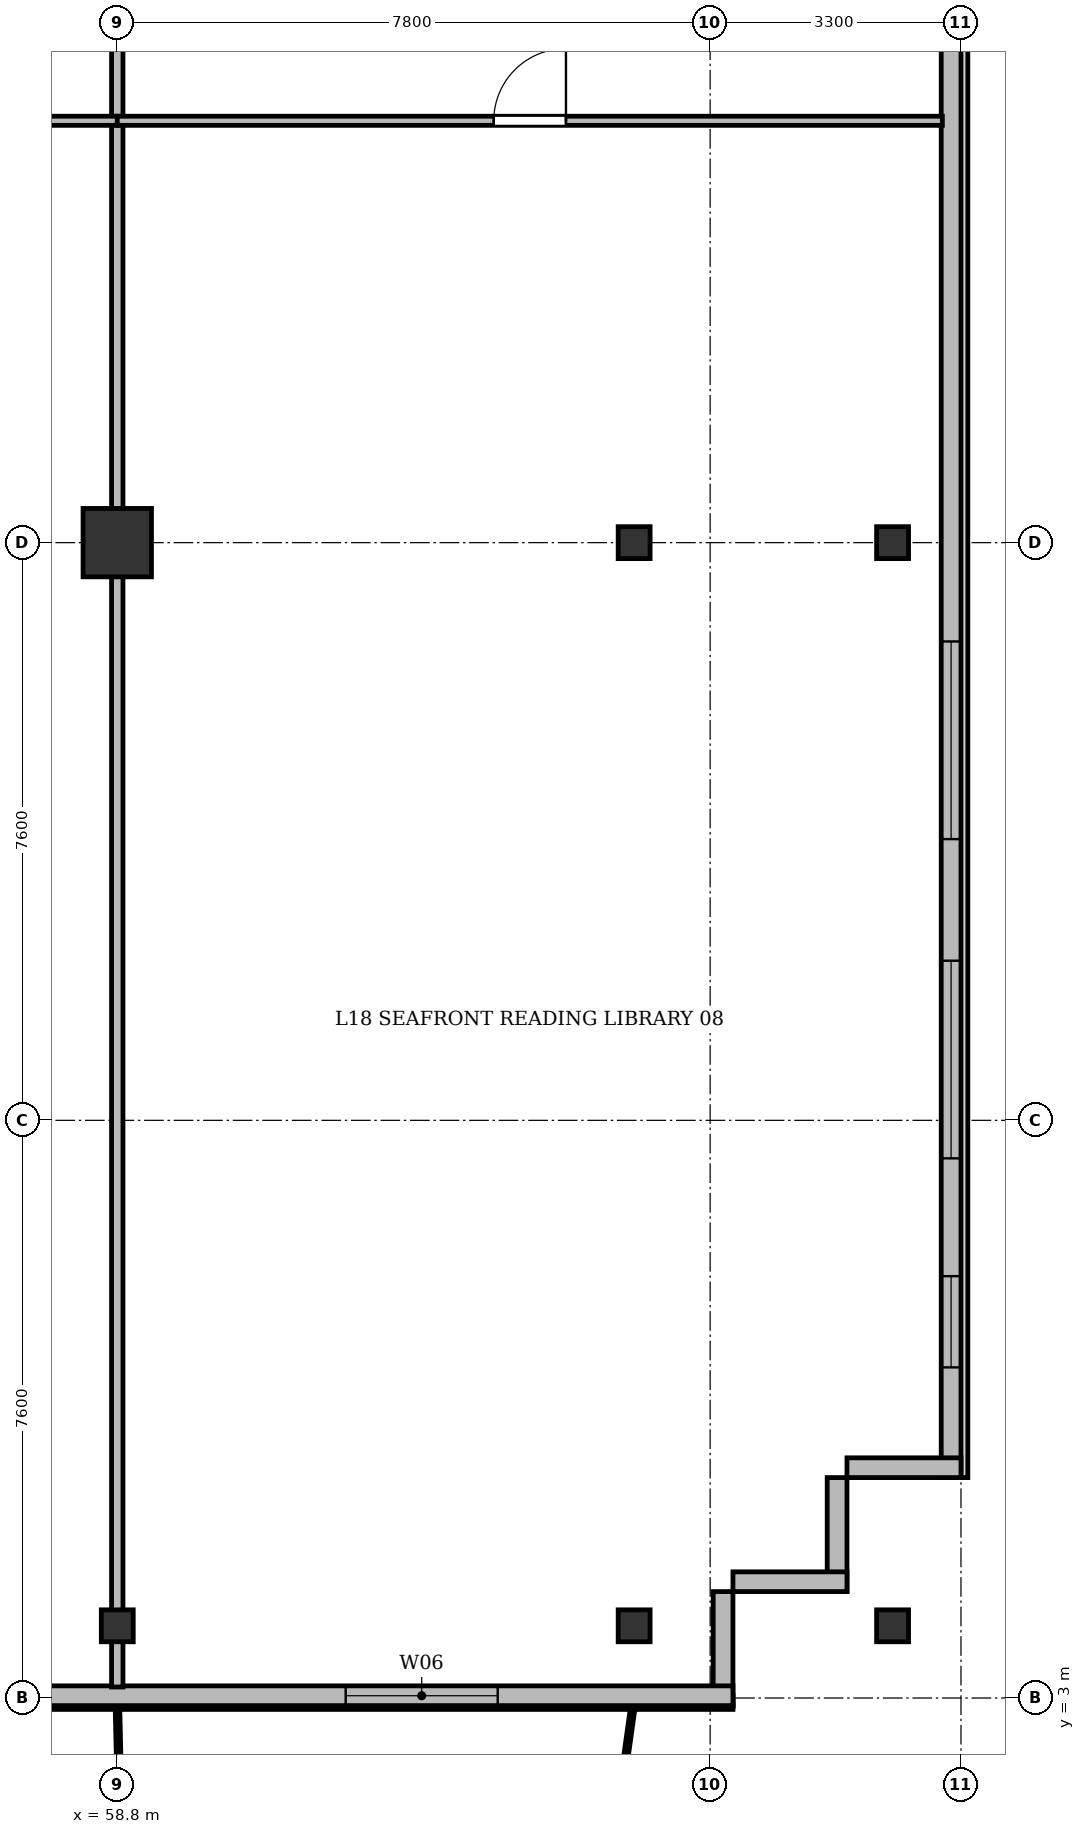
"""IFC4 building model, lengths in metres.
Left out: names, types, materials, properties, quantities, classifications, styles, units other than length and angle.
Written with IfcOpenShell. Run it as: python <this file> out.ifc"""

import sys

from ifc_helpers import new_model, si_unit, direction, frame, frame_2d, origin, origin_2d, place, context, subcontext, project, spatial, rectangle, i_section, extrude, source, transform, mapped, element, fill, save


model = new_model("IFC4")
c1 = context("Model", 3, precision=1e-05, world=origin(), true_north=direction((0.0, 1.0)))
c2 = subcontext(c1, "Body", "Model", "MODEL_VIEW")
j1 = project(units=[si_unit("LENGTHUNIT", "METRE"), si_unit("PLANEANGLEUNIT", "RADIAN")], contexts=[c1])
p1 = place(None, origin())
s1 = spatial("IfcSite", under=j1, at=p1, CompositionType="ELEMENT")
p2 = place(p1, origin())
s2 = spatial("IfcBuilding", under=s1, at=p2, CompositionType="ELEMENT")
p3 = place(p2, frame((0.0, 0.0, 70.3)))
s3 = spatial("IfcBuildingStorey", under=s2, at=p3, CompositionType="ELEMENT", Elevation=70.3)
m1 = source(origin(), c2, "Body", "SweptSolid", [
    extrude(i_section(OverallWidth=0.42, OverallDepth=0.42, WebThickness=0.026, FlangeThickness=0.04, at=origin_2d()), origin(), (0.0, 0.0, 1.0), 3.6),
])
p4 = place(p3, frame((58.8, 3.95, 0.0), z_axis=(0.0, 0.0, 1.0), x_axis=(1.0, 0.0, 0.0)))
e1 = element("IfcColumn", 1, at=p4, inside=s3, PredefinedType="COLUMN", context=c2, shape_type="MappedRepresentation", body=[
    mapped(m1, transform((0.0, 0.0, 0.0), x_axis=(1.0, 0.0, 0.0), y_axis=(0.0, 1.0, 0.0), z_axis=(0.0, 0.0, 1.0), scale=1.0)),
])
m2 = source(origin(), c2, "Body", "SweptSolid", [
    extrude(rectangle(XDim=0.9, YDim=0.9, at=origin_2d()), origin(), (0.0, 0.0, 1.0), 3.6),
])
p5 = place(p3, frame((58.8, 18.2, 0.0), z_axis=(0.0, 0.0, 1.0), x_axis=(1.0, 0.0, 0.0)))
e2 = element("IfcColumn", 2, at=p5, inside=s3, PredefinedType="COLUMN", context=c2, shape_type="MappedRepresentation", body=[
    mapped(m2, transform((0.0, 0.0, 0.0), x_axis=(1.0, 0.0, 0.0), y_axis=(0.0, 1.0, 0.0), z_axis=(0.0, 0.0, 1.0), scale=1.0)),
])
for number, where, z_axis, x_axis in (
    (3, (65.6, 3.95, 0.0), (0.0, 0.0, 1.0), (1.0, 0.0, 0.0)),
    (4, (65.6, 18.2, 0.0), (0.0, 0.0, 1.0), (1.0, 0.0, 0.0)),
    (5, (69.0, 3.95, 0.0), (0.0, 0.0, 1.0), (1.0, 0.0, 0.0)),
    (6, (69.0, 18.2, 0.0), (0.0, 0.0, 1.0), (1.0, 0.0, 0.0)),
):
    element("IfcColumn", number, at=place(p3, frame(where, z_axis=z_axis, x_axis=x_axis)), inside=s3, PredefinedType="COLUMN", context=c2, shape_type="MappedRepresentation", body=[
        mapped(m1, transform((0.0, 0.0, 0.0), x_axis=(1.0, 0.0, 0.0), y_axis=(0.0, 1.0, 0.0), z_axis=(0.0, 0.0, 1.0), scale=1.0)),
    ])
p6 = place(p3, frame((69.77, 45.5, 0.0), z_axis=(0.0, 0.0, 1.0), x_axis=(0.0, -1.0, 0.0)))
e7 = element("IfcWall", 7, at=p6, inside=s3, PredefinedType="SOLIDWALL", context=c2, shape_type="SweptSolid", body=[
    extrude(rectangle(XDim=39.6, YDim=0.26, at=frame_2d((19.8, 0.0))), origin(), (0.0, 0.0, 1.0), 3.22),
])
p7 = place(p6, frame((36.95, 0.0, 0.92)))
e8 = element("IfcOpeningElement", 8, at=p7, cuts=e7, PredefinedType="OPENING", context=c2, shape_type="SweptSolid", body=[
    extrude(rectangle(XDim=1.2, YDim=1.65, at=frame_2d((0.6, 0.825))), frame((0.0, 0.14, 0.0), z_axis=(0.0, -1.0, 0.0), x_axis=(1.0, 0.0, 0.0)), (0.0, 0.0, 1.0), 0.28),
])
p8 = place(p6, frame((32.8, 0.0, 0.92)))
e9 = element("IfcOpeningElement", 9, at=p8, cuts=e7, PredefinedType="OPENING", context=c2, shape_type="SweptSolid", body=[
    extrude(rectangle(XDim=2.6, YDim=1.9, at=frame_2d((1.3, 0.95))), frame((0.0, 0.14, 0.0), z_axis=(0.0, -1.0, 0.0), x_axis=(1.0, 0.0, 0.0)), (0.0, 0.0, 1.0), 0.28),
])
p9 = place(p6, frame((28.6, 0.0, 0.92)))
e10 = element("IfcOpeningElement", 10, at=p9, cuts=e7, PredefinedType="OPENING", context=c2, shape_type="SweptSolid", body=[
    extrude(rectangle(XDim=2.6, YDim=1.9, at=frame_2d((1.3, 0.95))), frame((0.0, 0.14, 0.0), z_axis=(0.0, -1.0, 0.0), x_axis=(1.0, 0.0, 0.0)), (0.0, 0.0, 1.0), 0.28),
])
p10 = place(p6, frame((7.4, 0.0, 0.92)))
e11 = element("IfcOpeningElement", 11, at=p10, cuts=e7, PredefinedType="OPENING", context=c2, shape_type="SweptSolid", body=[
    extrude(rectangle(XDim=2.6, YDim=1.9, at=frame_2d((1.3, 0.95))), frame((0.0, 0.14, 0.0), z_axis=(0.0, -1.0, 0.0), x_axis=(1.0, 0.0, 0.0)), (0.0, 0.0, 1.0), 0.28),
])
p11 = place(p6, frame((1.15, 0.0, 0.92)))
e12 = element("IfcOpeningElement", 12, at=p11, cuts=e7, PredefinedType="OPENING", context=c2, shape_type="SweptSolid", body=[
    extrude(rectangle(XDim=1.2, YDim=1.65, at=frame_2d((0.6, 0.825))), frame((0.0, 0.14, 0.0), z_axis=(0.0, -1.0, 0.0), x_axis=(1.0, 0.0, 0.0)), (0.0, 0.0, 1.0), 0.28),
])
p12 = place(p3, frame((69.9, 6.03, 0.0), z_axis=(0.0, 0.0, 1.0), x_axis=(-1.0, 0.0, 0.0)))
e13 = element("IfcWall", 13, at=p12, inside=s3, PredefinedType="SOLIDWALL", context=c2, shape_type="SweptSolid", body=[
    extrude(rectangle(XDim=1.5, YDim=0.26, at=frame_2d((0.75, 0.0))), origin(), (0.0, 0.0, 1.0), 2.632),
])
for number, where, z_axis, x_axis in (
    (14, (68.27, 5.9, 0.0), (0.0, 0.0, 1.0), (0.0, -1.0, 0.0)),
    (15, (68.4, 4.53, 0.0), (0.0, 0.0, 1.0), (-1.0, 0.0, 0.0)),
):
    element("IfcWall", number, at=place(p3, frame(where, z_axis=z_axis, x_axis=x_axis)), inside=s3, PredefinedType="SOLIDWALL", context=c2, shape_type="SweptSolid", body=[
        extrude(rectangle(XDim=1.5, YDim=0.26, at=frame_2d((0.75, 0.0))), origin(), (0.0, 0.0, 1.0), 3.22),
    ])
p13 = place(p3, frame((66.77, 4.4, 0.0), z_axis=(0.0, 0.0, 1.0), x_axis=(0.0, -1.0, 0.0)))
e16 = element("IfcWall", 16, at=p13, inside=s3, PredefinedType="SOLIDWALL", context=c2, shape_type="SweptSolid", body=[
    extrude(rectangle(XDim=1.5, YDim=0.26, at=frame_2d((0.75, 0.0))), origin(), (0.0, 0.0, 1.0), 2.57),
])
p14 = place(p3, frame((66.9, 3.03, 0.0), z_axis=(0.0, 0.0, 1.0), x_axis=(-1.0, 0.0, 0.0)))
e17 = element("IfcWall", 17, at=p14, inside=s3, PredefinedType="SOLIDWALL", context=c2, shape_type="SweptSolid", body=[
    extrude(rectangle(XDim=37.3, YDim=0.26, at=frame_2d((18.65, 0.0))), origin(), (0.0, 0.0, 1.0), 3.22),
])
p15 = place(p14, frame((3.095, 0.0, 0.9)))
e18 = element("IfcOpeningElement", 18, at=p15, cuts=e17, PredefinedType="OPENING", context=c2, shape_type="SweptSolid", body=[
    extrude(rectangle(XDim=2.0, YDim=1.95, at=frame_2d((1.0, 0.975))), frame((0.0, 0.14, 0.0), z_axis=(0.0, -1.0, 0.0), x_axis=(1.0, 0.0, 0.0)), (0.0, 0.0, 1.0), 0.28),
])
p16 = place(p14, frame((11.175, 0.0, 0.9)))
e19 = element("IfcOpeningElement", 19, at=p16, cuts=e17, PredefinedType="OPENING", context=c2, shape_type="SweptSolid", body=[
    extrude(rectangle(XDim=1.65, YDim=1.85, at=frame_2d((0.825, 0.925))), frame((0.0, 0.14, 0.0), z_axis=(0.0, -1.0, 0.0), x_axis=(1.0, 0.0, 0.0)), (0.0, 0.0, 1.0), 0.28),
])
p17 = place(p14, frame((17.007, 0.0, 0.0)))
e20 = element("IfcOpeningElement", 20, at=p17, cuts=e17, PredefinedType="OPENING", context=c2, shape_type="SweptSolid", body=[
    extrude(rectangle(XDim=1.2, YDim=2.2, at=frame_2d((0.6, 1.1))), frame((0.0, 0.14, 0.0), z_axis=(0.0, -1.0, 0.0), x_axis=(1.0, 0.0, 0.0)), (0.0, 0.0, 1.0), 0.28),
])
p18 = place(p14, frame((20.2, 0.0, 0.9)))
e21 = element("IfcOpeningElement", 21, at=p18, cuts=e17, PredefinedType="OPENING", context=c2, shape_type="SweptSolid", body=[
    extrude(rectangle(XDim=2.2, YDim=1.8, at=frame_2d((1.1, 0.9))), frame((0.0, 0.14, 0.0), z_axis=(0.0, -1.0, 0.0), x_axis=(1.0, 0.0, 0.0)), (0.0, 0.0, 1.0), 0.28),
])
p19 = place(p14, frame((28.95, 0.0, 0.9)))
e22 = element("IfcOpeningElement", 22, at=p19, cuts=e17, PredefinedType="OPENING", context=c2, shape_type="SweptSolid", body=[
    extrude(rectangle(XDim=1.5, YDim=1.75, at=frame_2d((0.75, 0.875))), frame((0.0, 0.14, 0.0), z_axis=(0.0, -1.0, 0.0), x_axis=(1.0, 0.0, 0.0)), (0.0, 0.0, 1.0), 0.28),
])
p20 = place(p3, frame((58.8, 3.145, 0.0), z_axis=(0.0, 0.0, 1.0), x_axis=(0.0, 1.0, 0.0)))
e23 = element("IfcWall", 23, at=p20, inside=s3, PredefinedType="PARTITIONING", context=c2, shape_type="SweptSolid", body=[
    extrude(rectangle(XDim=24.455, YDim=0.15, at=frame_2d((12.228, 0.0))), origin(), (0.0, 0.0, 1.0), 2.632),
])
p21 = place(p3, frame((51.0, 23.75, 0.0), z_axis=(0.0, 0.0, 1.0), x_axis=(1.0, 0.0, 0.0)))
e24 = element("IfcWall", 24, at=p21, inside=s3, PredefinedType="PARTITIONING", context=c2, shape_type="SweptSolid", body=[
    extrude(rectangle(XDim=7.8, YDim=0.12, at=frame_2d((3.9, 0.0))), origin(), (0.0, 0.0, 1.0), 2.632),
])
p22 = place(p21, frame((3.333, 0.0, 0.0)))
e25 = element("IfcOpeningElement", 25, at=p22, cuts=e24, PredefinedType="OPENING", context=c2, shape_type="SweptSolid", body=[
    extrude(rectangle(XDim=0.95, YDim=2.15, at=frame_2d((0.475, 1.075))), frame((0.0, 0.07, 0.0), z_axis=(0.0, -1.0, 0.0), x_axis=(1.0, 0.0, 0.0)), (0.0, 0.0, 1.0), 0.14),
])
p23 = place(p3, frame((58.8, 23.75, 0.0), z_axis=(0.0, 0.0, 1.0), x_axis=(1.0, 0.0, 0.0)))
e26 = element("IfcWall", 26, at=p23, inside=s3, PredefinedType="PARTITIONING", context=c2, shape_type="SweptSolid", body=[
    extrude(rectangle(XDim=10.855, YDim=0.12, at=frame_2d((5.427, 0.0))), origin(), (0.0, 0.0, 1.0), 2.632),
])
p24 = place(p23, frame((4.953, 0.0, 0.0)))
e27 = element("IfcOpeningElement", 27, at=p24, cuts=e26, PredefinedType="OPENING", context=c2, shape_type="SweptSolid", body=[
    extrude(rectangle(XDim=0.95, YDim=2.15, at=frame_2d((0.475, 1.075))), frame((0.0, 0.07, 0.0), z_axis=(0.0, -1.0, 0.0), x_axis=(1.0, 0.0, 0.0)), (0.0, 0.0, 1.0), 0.14),
])
m3 = source(origin(), c2, "Body", "SweptSolid", [
    extrude(rectangle(XDim=1.2, YDim=1.65, at=frame_2d((0.6, 0.825))), frame((0.0, 0.03, 0.0), z_axis=(0.0, -1.0, 0.0), x_axis=(1.0, 0.0, 0.0)), (0.0, 0.0, 1.0), 0.06),
])
p25 = place(p7, origin())
e28 = element("IfcWindow", 28, at=p25, inside=s3, PartitioningType="SINGLE_PANEL", PredefinedType="WINDOW", context=c2, shape_type="MappedRepresentation", body=[
    mapped(m3, transform((0.0, 0.0, 0.0), x_axis=(1.0, 0.0, 0.0), y_axis=(0.0, 1.0, 0.0), z_axis=(0.0, 0.0, 1.0), scale=1.0)),
])
fill(e8, e28)
m4 = source(origin(), c2, "Body", "SweptSolid", [
    extrude(rectangle(XDim=2.6, YDim=1.9, at=frame_2d((1.3, 0.95))), frame((0.0, 0.03, 0.0), z_axis=(0.0, -1.0, 0.0), x_axis=(1.0, 0.0, 0.0)), (0.0, 0.0, 1.0), 0.06),
])
p26 = place(p8, origin())
e29 = element("IfcWindow", 29, at=p26, inside=s3, PartitioningType="SINGLE_PANEL", PredefinedType="WINDOW", context=c2, shape_type="MappedRepresentation", body=[
    mapped(m4, transform((0.0, 0.0, 0.0), x_axis=(1.0, 0.0, 0.0), y_axis=(0.0, 1.0, 0.0), z_axis=(0.0, 0.0, 1.0), scale=1.0)),
])
fill(e9, e29)
p27 = place(p9, origin())
e30 = element("IfcWindow", 30, at=p27, inside=s3, PartitioningType="SINGLE_PANEL", PredefinedType="WINDOW", context=c2, shape_type="MappedRepresentation", body=[
    mapped(m4, transform((0.0, 0.0, 0.0), x_axis=(1.0, 0.0, 0.0), y_axis=(0.0, 1.0, 0.0), z_axis=(0.0, 0.0, 1.0), scale=1.0)),
])
fill(e10, e30)
m5 = source(origin(), c2, "Body", "SweptSolid", [
    extrude(rectangle(XDim=2.0, YDim=1.95, at=frame_2d((1.0, 0.975))), frame((0.0, 0.03, 0.0), z_axis=(0.0, -1.0, 0.0), x_axis=(1.0, 0.0, 0.0)), (0.0, 0.0, 1.0), 0.06),
])
p28 = place(p15, origin())
e31 = element("IfcWindow", 31, at=p28, inside=s3, PartitioningType="SINGLE_PANEL", PredefinedType="WINDOW", context=c2, shape_type="MappedRepresentation", body=[
    mapped(m5, transform((0.0, 0.0, 0.0), x_axis=(1.0, 0.0, 0.0), y_axis=(0.0, 1.0, 0.0), z_axis=(0.0, 0.0, 1.0), scale=1.0)),
])
fill(e18, e31)
m6 = source(origin(), c2, "Body", "SweptSolid", [
    extrude(rectangle(XDim=0.95, YDim=2.15, at=frame_2d((0.475, 1.075))), frame((0.0, 0.025, 0.0), z_axis=(0.0, -1.0, 0.0), x_axis=(1.0, 0.0, 0.0)), (0.0, 0.0, 1.0), 0.05),
])
p29 = place(p24, origin())
e32 = element("IfcDoor", 32, at=p29, inside=s3, OperationType="SINGLE_SWING_RIGHT", PredefinedType="DOOR", context=c2, shape_type="MappedRepresentation", body=[
    mapped(m6, transform((0.0, 0.0, 0.0), x_axis=(1.0, 0.0, 0.0), y_axis=(0.0, 1.0, 0.0), z_axis=(0.0, 0.0, 1.0), scale=1.0)),
])
fill(e27, e32)
save(model, sys.argv[1])
